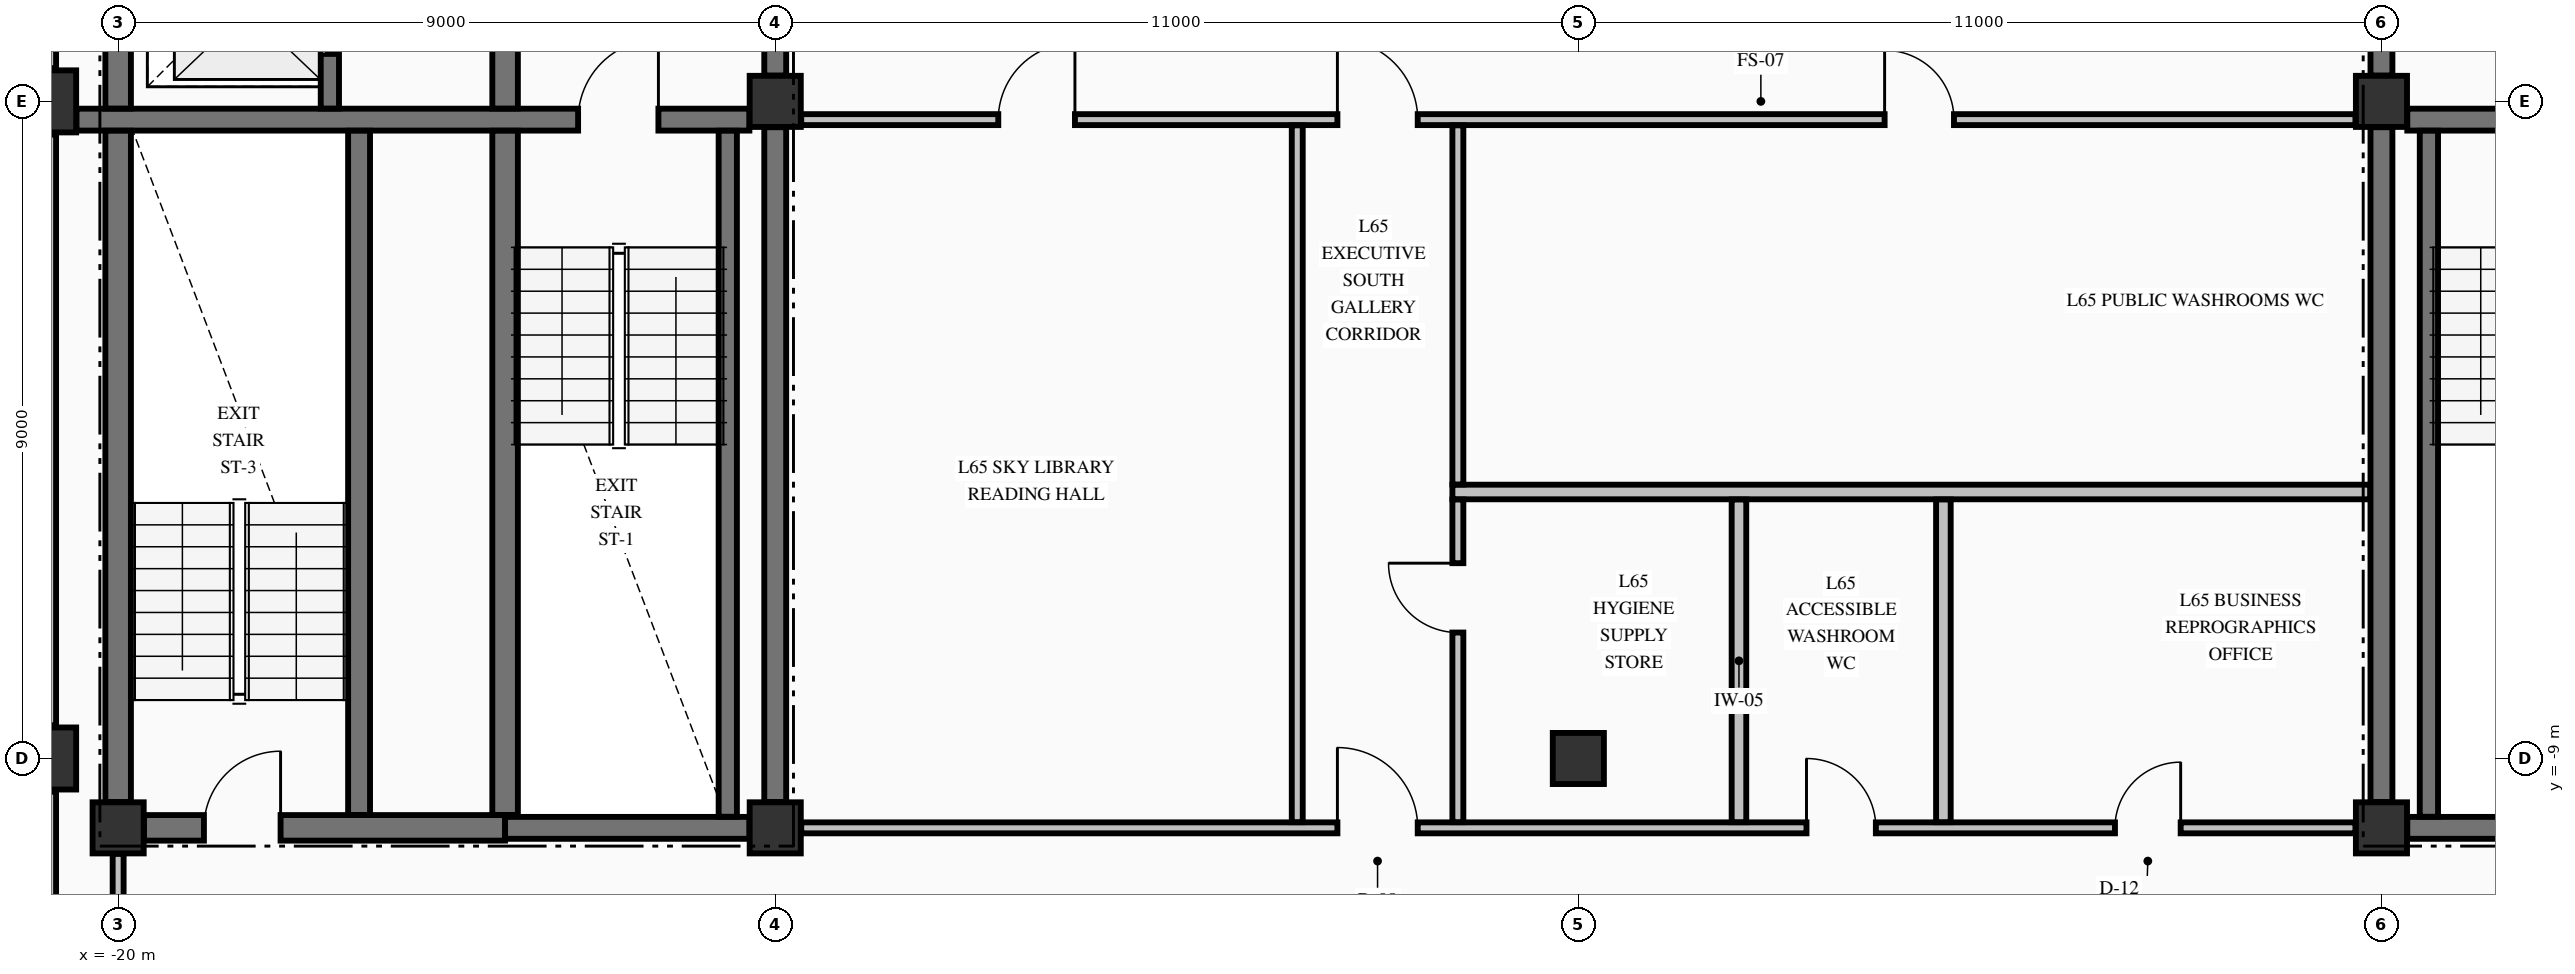
"""IFC4 building model, lengths in metres.
Left out: names, types, materials, properties, quantities, classifications, styles, units other than length and angle.
Written with IfcOpenShell. Run it as: python <this file> out.ifc"""

import sys

from ifc_helpers import new_model, si_unit, direction, frame, frame_2d, origin, origin_2d, place, context, subcontext, project, spatial, rectangle, extrude, element, fill, save


model = new_model("IFC4")
c1 = context("Model", 3, precision=1e-05, world=origin(), true_north=direction((0.0, 1.0)))
c2 = subcontext(c1, "Body", "Model", "MODEL_VIEW")
j1 = project(units=[si_unit("LENGTHUNIT", "METRE"), si_unit("PLANEANGLEUNIT", "RADIAN")], contexts=[c1])
p1 = place(None, origin())
s1 = spatial("IfcSite", under=j1, at=p1, CompositionType="ELEMENT")
p2 = place(p1, origin())
s2 = spatial("IfcBuilding", under=s1, at=p2, CompositionType="ELEMENT")
p3 = place(p2, frame((0.0, 0.0, 246.2)))
s3 = spatial("IfcBuildingStorey", under=s2, at=p3, CompositionType="ELEMENT", Elevation=246.2)
for number, where, z_axis, x_axis in (
    (1, (-21.0, -9.0, -0.25), (0.0, 0.0, 1.0), (1.0, 0.0, 0.0)),
    (2, (-21.0, 0.0, -0.25), (0.0, 0.0, 1.0), (1.0, 0.0, 0.0)),
):
    element("IfcColumn", number, at=place(p3, frame(where, z_axis=z_axis, x_axis=x_axis)), inside=s3, PredefinedType="COLUMN", context=c2, shape_type="SweptSolid", body=[
        extrude(rectangle(XDim=0.85, YDim=0.85, at=origin_2d()), origin(), (0.0, 0.0, 1.0), 3.055),
    ])
for number, where, z_axis, x_axis in (
    (3, (-20.0, -9.95, -0.25), (0.0, 0.0, 1.0), (1.0, 0.0, 0.0)),
    (4, (-11.0, -9.95, -0.25), (0.0, 0.0, 1.0), (1.0, 0.0, 0.0)),
    (5, (-11.0, 0.0, -0.25), (0.0, 0.0, 1.0), (1.0, 0.0, 0.0)),
    (6, (11.0, -9.95, -0.25), (0.0, 0.0, 1.0), (1.0, 0.0, 0.0)),
    (7, (11.0, 0.0, -0.25), (0.0, 0.0, 1.0), (1.0, 0.0, 0.0)),
    (8, (0.0, -9.0, -0.25), (0.0, 0.0, 1.0), (1.0, 0.0, 0.0)),
):
    element("IfcColumn", number, at=place(p3, frame(where, z_axis=z_axis, x_axis=x_axis)), inside=s3, PredefinedType="COLUMN", context=c2, shape_type="SweptSolid", body=[
        extrude(rectangle(XDim=0.7, YDim=0.7, at=origin_2d()), origin(), (0.0, 0.0, 1.0), 3.055),
    ])
for number, where, z_axis, x_axis in (
    (9, (-21.0, -9.455, 0.0), (0.0, 0.0, 1.0), (0.0, -1.0, 0.0)),
    (10, (-21.0, -0.455, 0.0), (0.0, 0.0, 1.0), (0.0, -1.0, 0.0)),
    (11, (-21.0, 8.545, 0.0), (0.0, 0.0, 1.0), (0.0, -1.0, 0.0)),
):
    element("IfcWall", number, at=place(p3, frame(where, z_axis=z_axis, x_axis=x_axis)), inside=s3, PredefinedType="STANDARD", context=c2, shape_type="SweptSolid", body=[
        extrude(rectangle(XDim=8.09, YDim=0.3, at=frame_2d((4.045, 0.0))), origin(), (0.0, 0.0, 1.0), 2.197),
    ])
p4 = place(p3, frame((-19.646, -9.95, 0.0), z_axis=(0.0, 0.0, 1.0), x_axis=(1.0, 0.0, 0.0)))
e12 = element("IfcWall", 12, at=p4, inside=s3, PredefinedType="SHEAR", context=c2, shape_type="SweptSolid", body=[
    extrude(rectangle(XDim=4.946, YDim=0.35, at=frame_2d((2.473, 0.0))), origin(), (0.0, 0.0, 1.0), 2.805),
])
p5 = place(p4, frame((0.821, 0.0, 0.0)))
e13 = element("IfcOpeningElement", 13, at=p5, cuts=e12, PredefinedType="OPENING", context=c2, shape_type="SweptSolid", body=[
    extrude(rectangle(XDim=1.05, YDim=2.15, at=frame_2d((0.525, 1.075))), frame((0.0, 0.185, 0.0), z_axis=(0.0, -1.0, 0.0), x_axis=(1.0, 0.0, 0.0)), (0.0, 0.0, 1.0), 0.37),
])
for number, where, z_axis, x_axis in (
    (14, (-14.7, -9.95, 0.0), (0.0, 0.0, 1.0), (1.0, 0.0, 0.0)),
    (15, (11.354, -9.95, 0.0), (0.0, 0.0, 1.0), (1.0, 0.0, 0.0)),
):
    element("IfcWall", number, at=place(p3, frame(where, z_axis=z_axis, x_axis=x_axis)), inside=s3, PredefinedType="SHEAR", context=c2, shape_type="SweptSolid", body=[
        extrude(rectangle(XDim=3.346, YDim=0.3, at=frame_2d((1.673, 0.0))), origin(), (0.0, 0.0, 1.0), 2.805),
    ])
p6 = place(p3, frame((-20.571, -0.25, 0.0), z_axis=(0.0, 0.0, 1.0), x_axis=(1.0, 0.0, 0.0)))
e16 = element("IfcWall", 16, at=p6, inside=s3, PredefinedType="SHEAR", context=c2, shape_type="SweptSolid", body=[
    extrude(rectangle(XDim=9.217, YDim=0.3, at=frame_2d((4.608, 0.0))), origin(), (0.0, 0.0, 1.0), 2.805),
])
p7 = place(p6, frame((6.871, 0.0, 0.0)))
e17 = element("IfcOpeningElement", 17, at=p7, cuts=e16, PredefinedType="OPENING", context=c2, shape_type="SweptSolid", body=[
    extrude(rectangle(XDim=1.1, YDim=2.15, at=frame_2d((0.55, 1.075))), frame((0.0, 0.16, 0.0), z_axis=(0.0, -1.0, 0.0), x_axis=(1.0, 0.0, 0.0)), (0.0, 0.0, 1.0), 0.32),
])
p8 = place(p3, frame((11.354, -0.25, 0.0), z_axis=(0.0, 0.0, 1.0), x_axis=(1.0, 0.0, 0.0)))
e18 = element("IfcWall", 18, at=p8, inside=s3, PredefinedType="SHEAR", context=c2, shape_type="SweptSolid", body=[
    extrude(rectangle(XDim=3.521, YDim=0.3, at=frame_2d((1.76, 0.0))), origin(), (0.0, 0.0, 1.0), 2.805),
])
p9 = place(p8, frame((1.246, 0.0, 0.0)))
e19 = element("IfcOpeningElement", 19, at=p9, cuts=e18, PredefinedType="OPENING", context=c2, shape_type="SweptSolid", body=[
    extrude(rectangle(XDim=1.1, YDim=2.15, at=frame_2d((0.55, 1.075))), frame((0.0, 0.16, 0.0), z_axis=(0.0, -1.0, 0.0), x_axis=(1.0, 0.0, 0.0)), (0.0, 0.0, 1.0), 0.32),
])
p10 = place(p3, frame((-10.644, -9.95, 0.0), z_axis=(0.0, 0.0, 1.0), x_axis=(1.0, 0.0, 0.0)))
e20 = element("IfcWall", 20, at=p10, inside=s3, PredefinedType="PARTITIONING", context=c2, shape_type="SweptSolid", body=[
    extrude(rectangle(XDim=21.288, YDim=0.15, at=frame_2d((10.644, 0.0))), origin(), (0.0, 0.0, 1.0), 2.805),
])
p11 = place(p10, frame((7.344, 0.0, 0.0)))
e21 = element("IfcOpeningElement", 21, at=p11, cuts=e20, PredefinedType="OPENING", context=c2, shape_type="SweptSolid", body=[
    extrude(rectangle(XDim=1.1, YDim=2.15, at=frame_2d((0.55, 1.075))), frame((0.0, 0.085, 0.0), z_axis=(0.0, -1.0, 0.0), x_axis=(1.0, 0.0, 0.0)), (0.0, 0.0, 1.0), 0.17),
])
p12 = place(p10, frame((13.769, 0.0, 0.0)))
e22 = element("IfcOpeningElement", 22, at=p12, cuts=e20, PredefinedType="OPENING", context=c2, shape_type="SweptSolid", body=[
    extrude(rectangle(XDim=0.95, YDim=2.15, at=frame_2d((0.475, 1.075))), frame((0.0, 0.085, 0.0), z_axis=(0.0, -1.0, 0.0), x_axis=(1.0, 0.0, 0.0)), (0.0, 0.0, 1.0), 0.17),
])
p13 = place(p10, frame((17.994, 0.0, 0.0)))
e23 = element("IfcOpeningElement", 23, at=p13, cuts=e20, PredefinedType="OPENING", context=c2, shape_type="SweptSolid", body=[
    extrude(rectangle(XDim=0.9, YDim=2.15, at=frame_2d((0.45, 1.075))), frame((0.0, 0.085, 0.0), z_axis=(0.0, -1.0, 0.0), x_axis=(1.0, 0.0, 0.0)), (0.0, 0.0, 1.0), 0.17),
])
p14 = place(p3, frame((-1.725, -5.35, 0.0), z_axis=(0.0, 0.0, 1.0), x_axis=(1.0, 0.0, 0.0)))
e24 = element("IfcWall", 24, at=p14, inside=s3, PredefinedType="PARTITIONING", context=c2, shape_type="SweptSolid", body=[
    extrude(rectangle(XDim=12.572, YDim=0.2, at=frame_2d((6.286, 0.0))), origin(), (0.0, 0.0, 1.0), 2.805),
])
p15 = place(p3, frame((-10.644, -0.25, 0.0), z_axis=(0.0, 0.0, 1.0), x_axis=(1.0, 0.0, 0.0)))
e25 = element("IfcWall", 25, at=p15, inside=s3, PredefinedType="PARTITIONING", context=c2, shape_type="SweptSolid", body=[
    extrude(rectangle(XDim=21.288, YDim=0.15, at=frame_2d((10.644, 0.0))), origin(), (0.0, 0.0, 1.0), 2.805),
])
p16 = place(p15, frame((7.344, 0.0, 0.0)))
e26 = element("IfcOpeningElement", 26, at=p16, cuts=e25, PredefinedType="OPENING", context=c2, shape_type="SweptSolid", body=[
    extrude(rectangle(XDim=1.1, YDim=2.15, at=frame_2d((0.55, 1.075))), frame((0.0, 0.085, 0.0), z_axis=(0.0, -1.0, 0.0), x_axis=(1.0, 0.0, 0.0)), (0.0, 0.0, 1.0), 0.17),
])
p17 = place(p15, frame((2.699, 0.0, 0.0)))
e27 = element("IfcOpeningElement", 27, at=p17, cuts=e25, PredefinedType="OPENING", context=c2, shape_type="SweptSolid", body=[
    extrude(rectangle(XDim=1.05, YDim=2.15, at=frame_2d((0.525, 1.075))), frame((0.0, 0.085, 0.0), z_axis=(0.0, -1.0, 0.0), x_axis=(1.0, 0.0, 0.0)), (0.0, 0.0, 1.0), 0.17),
])
p18 = place(p15, frame((14.839, 0.0, 0.0)))
e28 = element("IfcOpeningElement", 28, at=p18, cuts=e25, PredefinedType="OPENING", context=c2, shape_type="SweptSolid", body=[
    extrude(rectangle(XDim=0.95, YDim=2.15, at=frame_2d((0.475, 1.075))), frame((0.0, 0.085, 0.0), z_axis=(0.0, -1.0, 0.0), x_axis=(1.0, 0.0, 0.0)), (0.0, 0.0, 1.0), 0.17),
])
p19 = place(p3, frame((-20.0, -9.596, 0.0), z_axis=(0.0, 0.0, 1.0), x_axis=(0.0, 1.0, 0.0)))
e29 = element("IfcWall", 29, at=p19, inside=s3, PredefinedType="SHEAR", context=c2, shape_type="SweptSolid", body=[
    extrude(rectangle(XDim=9.194, YDim=0.35, at=frame_2d((4.597, 0.0))), origin(), (0.0, 0.0, 1.0), 2.805),
])
p20 = place(p3, frame((-20.0, -0.098, 0.0), z_axis=(0.0, 0.0, 1.0), x_axis=(0.0, 1.0, 0.0)))
e30 = element("IfcWall", 30, at=p20, inside=s3, PredefinedType="SHEAR", context=c2, shape_type="SweptSolid", body=[
    extrude(rectangle(XDim=2.621, YDim=0.35, at=frame_2d((1.311, 0.0))), origin(), (0.0, 0.0, 1.0), 2.805),
])
p21 = place(p3, frame((-17.1, -0.098, 0.0), z_axis=(0.0, 0.0, 1.0), x_axis=(0.0, 1.0, 0.0)))
e31 = element("IfcWall", 31, at=p21, inside=s3, PredefinedType="SOLIDWALL", context=c2, shape_type="SweptSolid", body=[
    extrude(rectangle(XDim=2.621, YDim=0.25, at=frame_2d((1.311, 0.0))), origin(), (0.0, 0.0, 1.0), 2.805),
])
p22 = place(p21, frame((0.748, 0.0, 0.0)))
e32 = element("IfcOpeningElement", 32, at=p22, cuts=e31, PredefinedType="OPENING", context=c2, shape_type="SweptSolid", body=[
    extrude(rectangle(XDim=1.1, YDim=2.2, at=frame_2d((0.55, 1.1))), frame((0.0, 0.135, 0.0), z_axis=(0.0, -1.0, 0.0), x_axis=(1.0, 0.0, 0.0)), (0.0, 0.0, 1.0), 0.27),
])
p23 = place(p3, frame((-16.7, -9.773, 0.0), z_axis=(0.0, 0.0, 1.0), x_axis=(0.0, 1.0, 0.0)))
e33 = element("IfcWall", 33, at=p23, inside=s3, PredefinedType="SHEAR", context=c2, shape_type="SweptSolid", body=[
    extrude(rectangle(XDim=9.371, YDim=0.3, at=frame_2d((4.686, 0.0))), origin(), (0.0, 0.0, 1.0), 2.805),
])
p24 = place(p3, frame((-14.7, -9.773, 0.0), z_axis=(0.0, 0.0, 1.0), x_axis=(0.0, 1.0, 0.0)))
e34 = element("IfcWall", 34, at=p24, inside=s3, PredefinedType="SHEAR", context=c2, shape_type="SweptSolid", body=[
    extrude(rectangle(XDim=9.371, YDim=0.35, at=frame_2d((4.686, 0.0))), origin(), (0.0, 0.0, 1.0), 2.805),
])
p25 = place(p3, frame((-14.7, -0.098, 0.0), z_axis=(0.0, 0.0, 1.0), x_axis=(0.0, 1.0, 0.0)))
e35 = element("IfcWall", 35, at=p25, inside=s3, PredefinedType="SHEAR", context=c2, shape_type="SweptSolid", body=[
    extrude(rectangle(XDim=2.846, YDim=0.35, at=frame_2d((1.423, 0.0))), origin(), (0.0, 0.0, 1.0), 2.805),
])
p26 = place(p3, frame((-11.65, -9.798, 0.0), z_axis=(0.0, 0.0, 1.0), x_axis=(0.0, 1.0, 0.0)))
e36 = element("IfcWall", 36, at=p26, inside=s3, PredefinedType="SOLIDWALL", context=c2, shape_type="SweptSolid", body=[
    extrude(rectangle(XDim=9.396, YDim=0.25, at=frame_2d((4.698, 0.0))), origin(), (0.0, 0.0, 1.0), 2.805),
])
p27 = place(p3, frame((-11.0, -9.596, 0.0), z_axis=(0.0, 0.0, 1.0), x_axis=(0.0, 1.0, 0.0)))
e37 = element("IfcWall", 37, at=p27, inside=s3, PredefinedType="SHEAR", context=c2, shape_type="SweptSolid", body=[
    extrude(rectangle(XDim=9.242, YDim=0.3, at=frame_2d((4.621, 0.0))), origin(), (0.0, 0.0, 1.0), 2.805),
])
p28 = place(p3, frame((-11.0, 0.354, 0.0), z_axis=(0.0, 0.0, 1.0), x_axis=(0.0, 1.0, 0.0)))
e38 = element("IfcWall", 38, at=p28, inside=s3, PredefinedType="SHEAR", context=c2, shape_type="SweptSolid", body=[
    extrude(rectangle(XDim=2.394, YDim=0.3, at=frame_2d((1.197, 0.0))), origin(), (0.0, 0.0, 1.0), 2.805),
])
p29 = place(p28, frame((0.746, 0.0, 0.0)))
e39 = element("IfcOpeningElement", 39, at=p29, cuts=e38, PredefinedType="OPENING", context=c2, shape_type="SweptSolid", body=[
    extrude(rectangle(XDim=1.1, YDim=2.15, at=frame_2d((0.55, 1.075))), frame((0.0, 0.16, 0.0), z_axis=(0.0, -1.0, 0.0), x_axis=(1.0, 0.0, 0.0)), (0.0, 0.0, 1.0), 0.32),
])
p30 = place(p3, frame((11.0, -9.596, 0.0), z_axis=(0.0, 0.0, 1.0), x_axis=(0.0, 1.0, 0.0)))
e40 = element("IfcWall", 40, at=p30, inside=s3, PredefinedType="SHEAR", context=c2, shape_type="SweptSolid", body=[
    extrude(rectangle(XDim=9.242, YDim=0.3, at=frame_2d((4.621, 0.0))), origin(), (0.0, 0.0, 1.0), 2.805),
])
p31 = place(p3, frame((11.0, 0.354, 0.0), z_axis=(0.0, 0.0, 1.0), x_axis=(0.0, 1.0, 0.0)))
e41 = element("IfcWall", 41, at=p31, inside=s3, PredefinedType="SHEAR", context=c2, shape_type="SweptSolid", body=[
    extrude(rectangle(XDim=2.394, YDim=0.3, at=frame_2d((1.197, 0.0))), origin(), (0.0, 0.0, 1.0), 2.805),
])
p32 = place(p31, frame((0.746, 0.0, 0.0)))
e42 = element("IfcOpeningElement", 42, at=p32, cuts=e41, PredefinedType="OPENING", context=c2, shape_type="SweptSolid", body=[
    extrude(rectangle(XDim=1.1, YDim=2.15, at=frame_2d((0.55, 1.075))), frame((0.0, 0.16, 0.0), z_axis=(0.0, -1.0, 0.0), x_axis=(1.0, 0.0, 0.0)), (0.0, 0.0, 1.0), 0.32),
])
p33 = place(p3, frame((11.65, -9.798, 0.0), z_axis=(0.0, 0.0, 1.0), x_axis=(0.0, 1.0, 0.0)))
e43 = element("IfcWall", 43, at=p33, inside=s3, PredefinedType="SOLIDWALL", context=c2, shape_type="SweptSolid", body=[
    extrude(rectangle(XDim=9.396, YDim=0.25, at=frame_2d((4.698, 0.0))), origin(), (0.0, 0.0, 1.0), 2.805),
])
p34 = place(p3, frame((-20.0, -12.122, 0.0), z_axis=(0.0, 0.0, 1.0), x_axis=(0.0, 1.0, 0.0)))
e44 = element("IfcWall", 44, at=p34, inside=s3, PredefinedType="PARTITIONING", context=c2, shape_type="SweptSolid", body=[
    extrude(rectangle(XDim=1.816, YDim=0.15, at=frame_2d((0.908, 0.0))), origin(), (0.0, 0.0, 1.0), 2.395),
])
p35 = place(p3, frame((-3.85, -9.872, 0.0), z_axis=(0.0, 0.0, 1.0), x_axis=(0.0, 1.0, 0.0)))
e45 = element("IfcWall", 45, at=p35, inside=s3, PredefinedType="PARTITIONING", context=c2, shape_type="SweptSolid", body=[
    extrude(rectangle(XDim=9.544, YDim=0.15, at=frame_2d((4.772, 0.0))), origin(), (0.0, 0.0, 1.0), 2.805),
])
p36 = place(p3, frame((-1.65, -9.872, 0.0), z_axis=(0.0, 0.0, 1.0), x_axis=(0.0, 1.0, 0.0)))
e46 = element("IfcWall", 46, at=p36, inside=s3, PredefinedType="PARTITIONING", context=c2, shape_type="SweptSolid", body=[
    extrude(rectangle(XDim=4.419, YDim=0.15, at=frame_2d((2.209, 0.0))), origin(), (0.0, 0.0, 1.0), 2.805),
])
p37 = place(p36, frame((2.597, 0.0, 0.0)))
e47 = element("IfcOpeningElement", 47, at=p37, cuts=e46, PredefinedType="OPENING", context=c2, shape_type="SweptSolid", body=[
    extrude(rectangle(XDim=0.95, YDim=2.15, at=frame_2d((0.475, 1.075))), frame((0.0, 0.085, 0.0), z_axis=(0.0, -1.0, 0.0), x_axis=(1.0, 0.0, 0.0)), (0.0, 0.0, 1.0), 0.17),
])
p38 = place(p3, frame((-1.65, -5.247, 0.0), z_axis=(0.0, 0.0, 1.0), x_axis=(0.0, 1.0, 0.0)))
e48 = element("IfcWall", 48, at=p38, inside=s3, PredefinedType="PARTITIONING", context=c2, shape_type="SweptSolid", body=[
    extrude(rectangle(XDim=4.919, YDim=0.15, at=frame_2d((2.459, 0.0))), origin(), (0.0, 0.0, 1.0), 2.805),
])
for number, where, z_axis, x_axis in (
    (49, (2.2, -9.872, 0.0), (0.0, 0.0, 1.0), (0.0, 1.0, 0.0)),
    (50, (5.0, -9.872, 0.0), (0.0, 0.0, 1.0), (0.0, 1.0, 0.0)),
):
    element("IfcWall", number, at=place(p3, frame(where, z_axis=z_axis, x_axis=x_axis)), inside=s3, PredefinedType="PARTITIONING", context=c2, shape_type="SweptSolid", body=[
        extrude(rectangle(XDim=4.419, YDim=0.2, at=frame_2d((2.209, 0.0))), origin(), (0.0, 0.0, 1.0), 2.805),
    ])
p39 = place(p7, origin())
e51 = element("IfcDoor", 51, at=p39, inside=s3, OperationType="SINGLE_SWING_RIGHT", PredefinedType="DOOR", context=c2, shape_type="SweptSolid", body=[
    extrude(rectangle(XDim=1.1, YDim=2.15, at=frame_2d((0.55, 1.075))), frame((0.0, 0.025, 0.0), z_axis=(0.0, -1.0, 0.0), x_axis=(1.0, 0.0, 0.0)), (0.0, 0.0, 1.0), 0.05),
])
fill(e17, e51)
p40 = place(p5, origin())
e52 = element("IfcDoor", 52, at=p40, inside=s3, OperationType="SINGLE_SWING_RIGHT", PredefinedType="DOOR", context=c2, shape_type="SweptSolid", body=[
    extrude(rectangle(XDim=1.05, YDim=2.15, at=frame_2d((0.525, 1.075))), frame((0.0, 0.025, 0.0), z_axis=(0.0, -1.0, 0.0), x_axis=(1.0, 0.0, 0.0)), (0.0, 0.0, 1.0), 0.05),
])
fill(e13, e52)
p41 = place(p22, origin())
e53 = element("IfcDoor", 53, at=p41, inside=s3, OperationType="SLIDING_TO_LEFT", PredefinedType="DOOR", context=c2, shape_type="SweptSolid", body=[
    extrude(rectangle(XDim=1.1, YDim=2.2, at=frame_2d((0.55, 1.1))), frame((0.0, 0.025, 0.0), z_axis=(0.0, -1.0, 0.0), x_axis=(1.0, 0.0, 0.0)), (0.0, 0.0, 1.0), 0.05),
])
fill(e32, e53)
p42 = place(p11, origin())
e54 = element("IfcDoor", 54, at=p42, inside=s3, OperationType="SINGLE_SWING_LEFT", PredefinedType="DOOR", context=c2, shape_type="SweptSolid", body=[
    extrude(rectangle(XDim=1.1, YDim=2.15, at=frame_2d((0.55, 1.075))), frame((0.0, 0.025, 0.0), z_axis=(0.0, -1.0, 0.0), x_axis=(1.0, 0.0, 0.0)), (0.0, 0.0, 1.0), 0.05),
])
fill(e21, e54)
p43 = place(p16, origin())
e55 = element("IfcDoor", 55, at=p43, inside=s3, OperationType="SINGLE_SWING_LEFT", PredefinedType="DOOR", context=c2, shape_type="SweptSolid", body=[
    extrude(rectangle(XDim=1.1, YDim=2.15, at=frame_2d((0.55, 1.075))), frame((0.0, 0.025, 0.0), z_axis=(0.0, -1.0, 0.0), x_axis=(1.0, 0.0, 0.0)), (0.0, 0.0, 1.0), 0.05),
])
fill(e26, e55)
p44 = place(p17, origin())
e56 = element("IfcDoor", 56, at=p44, inside=s3, OperationType="SINGLE_SWING_RIGHT", PredefinedType="DOOR", context=c2, shape_type="SweptSolid", body=[
    extrude(rectangle(XDim=1.05, YDim=2.15, at=frame_2d((0.525, 1.075))), frame((0.0, 0.025, 0.0), z_axis=(0.0, -1.0, 0.0), x_axis=(1.0, 0.0, 0.0)), (0.0, 0.0, 1.0), 0.05),
])
fill(e27, e56)
p45 = place(p18, origin())
e57 = element("IfcDoor", 57, at=p45, inside=s3, OperationType="SINGLE_SWING_LEFT", PredefinedType="DOOR", context=c2, shape_type="SweptSolid", body=[
    extrude(rectangle(XDim=0.95, YDim=2.15, at=frame_2d((0.475, 1.075))), frame((0.0, 0.025, 0.0), z_axis=(0.0, -1.0, 0.0), x_axis=(1.0, 0.0, 0.0)), (0.0, 0.0, 1.0), 0.05),
])
fill(e28, e57)
p46 = place(p37, origin())
e58 = element("IfcDoor", 58, at=p46, inside=s3, OperationType="SINGLE_SWING_RIGHT", PredefinedType="DOOR", context=c2, shape_type="SweptSolid", body=[
    extrude(rectangle(XDim=0.95, YDim=2.15, at=frame_2d((0.475, 1.075))), frame((0.0, 0.025, 0.0), z_axis=(0.0, -1.0, 0.0), x_axis=(1.0, 0.0, 0.0)), (0.0, 0.0, 1.0), 0.05),
])
fill(e47, e58)
p47 = place(p12, origin())
e59 = element("IfcDoor", 59, at=p47, inside=s3, OperationType="SINGLE_SWING_LEFT", PredefinedType="DOOR", context=c2, shape_type="SweptSolid", body=[
    extrude(rectangle(XDim=0.95, YDim=2.15, at=frame_2d((0.475, 1.075))), frame((0.0, 0.025, 0.0), z_axis=(0.0, -1.0, 0.0), x_axis=(1.0, 0.0, 0.0)), (0.0, 0.0, 1.0), 0.05),
])
fill(e22, e59)
p48 = place(p13, origin())
e60 = element("IfcDoor", 60, at=p48, inside=s3, OperationType="SINGLE_SWING_RIGHT", PredefinedType="DOOR", context=c2, shape_type="SweptSolid", body=[
    extrude(rectangle(XDim=0.9, YDim=2.15, at=frame_2d((0.45, 1.075))), frame((0.0, 0.025, 0.0), z_axis=(0.0, -1.0, 0.0), x_axis=(1.0, 0.0, 0.0)), (0.0, 0.0, 1.0), 0.05),
])
fill(e23, e60)
save(model, sys.argv[1])
